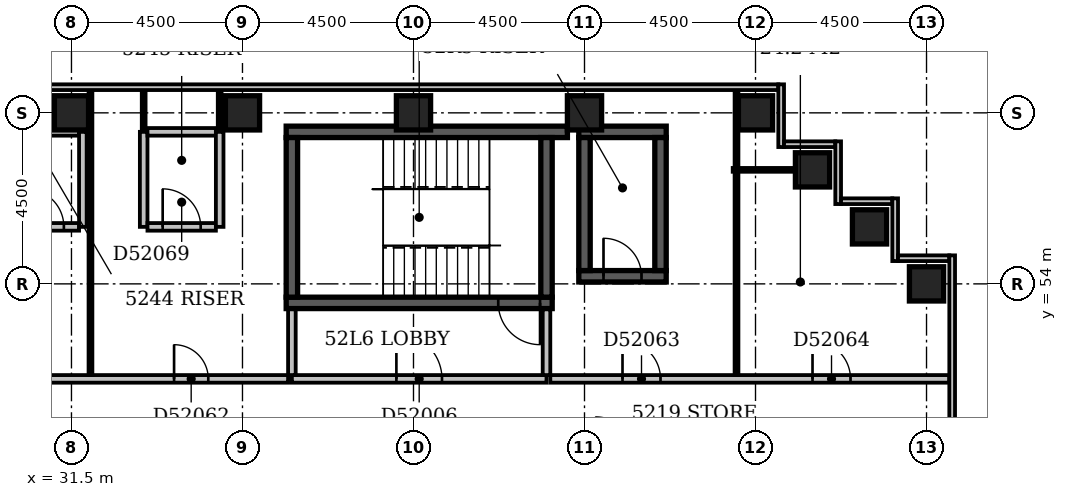
"""IFC4 building model, lengths in metres.
Left out: names, types, materials, properties, quantities, classifications, styles, units other than length and angle.
Written with IfcOpenShell. Run it as: python <this file> out.ifc"""

import sys

from ifc_helpers import new_model, si_unit, direction, frame, frame_2d, origin, origin_2d, place, context, subcontext, project, spatial, rectangle, extrude, element, fill, save


model = new_model("IFC4")
c1 = context("Model", 3, precision=1e-05, world=origin(), true_north=direction((0.0, 1.0)))
c2 = subcontext(c1, "Body", "Model", "MODEL_VIEW")
j1 = project(units=[si_unit("LENGTHUNIT", "METRE"), si_unit("PLANEANGLEUNIT", "RADIAN")], contexts=[c1])
p1 = place(None, origin())
s1 = spatial("IfcSite", under=j1, at=p1, CompositionType="ELEMENT")
p2 = place(p1, origin())
s2 = spatial("IfcBuilding", under=s1, at=p2, CompositionType="ELEMENT")
p3 = place(p2, frame((0.0, 0.0, 204.2)))
s3 = spatial("IfcBuildingStorey", under=s2, at=p3, CompositionType="ELEMENT", Elevation=204.2)
p4 = place(p3, frame((37.15, 53.5, -0.3), z_axis=(0.0, 0.0, 1.0), x_axis=(1.0, 0.0, 0.0)))
e1 = element("IfcWall", 1, at=p4, inside=s3, PredefinedType="SHEAR", context=c2, shape_type="SweptSolid", body=[
    extrude(rectangle(XDim=7.0, YDim=0.3, at=frame_2d((3.5, 0.0))), origin(), (0.0, 0.0, 1.0), 3.6),
])
p5 = place(p4, frame((5.58, 0.0, 0.3)))
e2 = element("IfcOpeningElement", 2, at=p5, cuts=e1, PredefinedType="OPENING", context=c2, shape_type="SweptSolid", body=[
    extrude(rectangle(XDim=1.1, YDim=2.1, at=frame_2d((0.55, 1.05))), frame((0.0, 0.162, 0.0), z_axis=(0.0, -1.0, 0.0), x_axis=(1.0, 0.0, 0.0)), (0.0, 0.0, 1.0), 0.324),
])
p6 = place(p3, frame((37.15, 58.0, -0.3), z_axis=(0.0, 0.0, 1.0), x_axis=(1.0, 0.0, 0.0)))
e3 = element("IfcWall", 3, at=p6, inside=s3, PredefinedType="SHEAR", context=c2, shape_type="SweptSolid", body=[
    extrude(rectangle(XDim=7.4, YDim=0.3, at=frame_2d((3.7, 0.0))), origin(), (0.0, 0.0, 1.0), 3.6),
])
for number, where, z_axis, x_axis in (
    (4, (37.3, 53.65, -0.3), (0.0, 0.0, 1.0), (0.0, 1.0, 0.0)),
    (5, (44.0, 53.65, -0.3), (0.0, 0.0, 1.0), (0.0, 1.0, 0.0)),
):
    element("IfcWall", number, at=place(p3, frame(where, z_axis=z_axis, x_axis=x_axis)), inside=s3, PredefinedType="SHEAR", context=c2, shape_type="SweptSolid", body=[
        extrude(rectangle(XDim=4.2, YDim=0.3, at=frame_2d((2.1, 0.0))), origin(), (0.0, 0.0, 1.0), 3.6),
    ])
p7 = place(p3, frame((44.85, 54.2, -0.3), z_axis=(0.0, 0.0, 1.0), x_axis=(1.0, 0.0, 0.0)))
e6 = element("IfcWall", 6, at=p7, inside=s3, PredefinedType="SHEAR", context=c2, shape_type="SweptSolid", body=[
    extrude(rectangle(XDim=2.3, YDim=0.3, at=frame_2d((1.15, 0.0))), origin(), (0.0, 0.0, 1.0), 3.6),
])
p8 = place(p7, frame((0.65, 0.0, 0.3)))
e7 = element("IfcOpeningElement", 7, at=p8, cuts=e6, PredefinedType="OPENING", context=c2, shape_type="SweptSolid", body=[
    extrude(rectangle(XDim=1.0, YDim=2.1, at=frame_2d((0.5, 1.05))), frame((0.0, 0.162, 0.0), z_axis=(0.0, -1.0, 0.0), x_axis=(1.0, 0.0, 0.0)), (0.0, 0.0, 1.0), 0.324),
])
p9 = place(p3, frame((44.85, 58.0, -0.3), z_axis=(0.0, 0.0, 1.0), x_axis=(1.0, 0.0, 0.0)))
e8 = element("IfcWall", 8, at=p9, inside=s3, PredefinedType="SHEAR", context=c2, shape_type="SweptSolid", body=[
    extrude(rectangle(XDim=2.3, YDim=0.3, at=frame_2d((1.15, 0.0))), origin(), (0.0, 0.0, 1.0), 3.6),
])
for number, where, z_axis, x_axis in (
    (9, (45.0, 54.35, -0.3), (0.0, 0.0, 1.0), (0.0, 1.0, 0.0)),
    (10, (47.0, 54.35, -0.3), (0.0, 0.0, 1.0), (0.0, 1.0, 0.0)),
):
    element("IfcWall", number, at=place(p3, frame(where, z_axis=z_axis, x_axis=x_axis)), inside=s3, PredefinedType="SHEAR", context=c2, shape_type="SweptSolid", body=[
        extrude(rectangle(XDim=3.5, YDim=0.3, at=frame_2d((1.75, 0.0))), origin(), (0.0, 0.0, 1.0), 3.6),
    ])
for number, where, z_axis, x_axis in (
    (11, (54.0, 54.0, -0.3), (0.0, 0.0, 1.0), (1.0, 0.0, 0.0)),
    (12, (52.5, 55.5, -0.3), (0.0, 0.0, 1.0), (1.0, 0.0, 0.0)),
    (13, (51.0, 57.0, -0.3), (0.0, 0.0, 1.0), (1.0, 0.0, 0.0)),
    (14, (31.5, 58.5, -0.3), (0.0, 0.0, 1.0), (1.0, 0.0, 0.0)),
    (15, (36.0, 58.5, -0.3), (0.0, 0.0, 1.0), (1.0, 0.0, 0.0)),
    (16, (40.5, 58.5, -0.3), (0.0, 0.0, 1.0), (1.0, 0.0, 0.0)),
    (17, (45.0, 58.5, -0.3), (0.0, 0.0, 1.0), (1.0, 0.0, 0.0)),
    (18, (49.5, 58.5, -0.3), (0.0, 0.0, 1.0), (1.0, 0.0, 0.0)),
):
    element("IfcColumn", number, at=place(p3, frame(where, z_axis=z_axis, x_axis=x_axis)), inside=s3, PredefinedType="COLUMN", context=c2, shape_type="SweptSolid", body=[
        extrude(rectangle(XDim=0.9, YDim=0.9, at=origin_2d()), origin(), (0.0, 0.0, 1.0), 3.6),
    ])
p10 = place(p3, frame((54.675, 39.9, 0.0), z_axis=(0.0, 0.0, 1.0), x_axis=(0.0, 1.0, 0.0)))
e19 = element("IfcWall", 19, at=p10, inside=s3, PredefinedType="STANDARD", context=c2, shape_type="SweptSolid", body=[
    extrude(rectangle(XDim=14.85, YDim=0.15, at=frame_2d((7.425, 0.0))), origin(), (0.0, 0.0, 1.0), 2.7),
])
p11 = place(p10, frame((6.15, 0.0, 0.6)))
e20 = element("IfcOpeningElement", 20, at=p11, cuts=e19, PredefinedType="OPENING", context=c2, shape_type="SweptSolid", body=[
    extrude(rectangle(XDim=2.4, YDim=1.8, at=frame_2d((1.2, 0.9))), frame((0.0, 0.087, 0.0), z_axis=(0.0, -1.0, 0.0), x_axis=(1.0, 0.0, 0.0)), (0.0, 0.0, 1.0), 0.174),
])
p12 = place(p3, frame((54.6, 54.675, 0.0), z_axis=(0.0, 0.0, 1.0), x_axis=(-1.0, 0.0, 0.0)))
e21 = element("IfcWall", 21, at=p12, inside=s3, PredefinedType="STANDARD", context=c2, shape_type="SweptSolid", body=[
    extrude(rectangle(XDim=1.35, YDim=0.15, at=frame_2d((0.675, 0.0))), origin(), (0.0, 0.0, 1.0), 2.7),
])
p13 = place(p3, frame((53.175, 54.6, 0.0), z_axis=(0.0, 0.0, 1.0), x_axis=(0.0, 1.0, 0.0)))
e22 = element("IfcWall", 22, at=p13, inside=s3, PredefinedType="STANDARD", context=c2, shape_type="SweptSolid", body=[
    extrude(rectangle(XDim=1.65, YDim=0.15, at=frame_2d((0.825, 0.0))), origin(), (0.0, 0.0, 1.0), 2.7),
])
p14 = place(p3, frame((53.1, 56.175, 0.0), z_axis=(0.0, 0.0, 1.0), x_axis=(-1.0, 0.0, 0.0)))
e23 = element("IfcWall", 23, at=p14, inside=s3, PredefinedType="STANDARD", context=c2, shape_type="SweptSolid", body=[
    extrude(rectangle(XDim=1.35, YDim=0.15, at=frame_2d((0.675, 0.0))), origin(), (0.0, 0.0, 1.0), 2.7),
])
p15 = place(p3, frame((51.675, 56.1, 0.0), z_axis=(0.0, 0.0, 1.0), x_axis=(0.0, 1.0, 0.0)))
e24 = element("IfcWall", 24, at=p15, inside=s3, PredefinedType="STANDARD", context=c2, shape_type="SweptSolid", body=[
    extrude(rectangle(XDim=1.65, YDim=0.15, at=frame_2d((0.825, 0.0))), origin(), (0.0, 0.0, 1.0), 2.7),
])
p16 = place(p3, frame((51.6, 57.675, 0.0), z_axis=(0.0, 0.0, 1.0), x_axis=(-1.0, 0.0, 0.0)))
e25 = element("IfcWall", 25, at=p16, inside=s3, PredefinedType="STANDARD", context=c2, shape_type="SweptSolid", body=[
    extrude(rectangle(XDim=1.35, YDim=0.15, at=frame_2d((0.675, 0.0))), origin(), (0.0, 0.0, 1.0), 2.7),
])
p17 = place(p3, frame((50.175, 57.6, 0.0), z_axis=(0.0, 0.0, 1.0), x_axis=(0.0, 1.0, 0.0)))
e26 = element("IfcWall", 26, at=p17, inside=s3, PredefinedType="STANDARD", context=c2, shape_type="SweptSolid", body=[
    extrude(rectangle(XDim=1.65, YDim=0.15, at=frame_2d((0.825, 0.0))), origin(), (0.0, 0.0, 1.0), 2.7),
])
p18 = place(p3, frame((50.1, 59.175, 0.0), z_axis=(0.0, 0.0, 1.0), x_axis=(-1.0, 0.0, 0.0)))
e27 = element("IfcWall", 27, at=p18, inside=s3, PredefinedType="STANDARD", context=c2, shape_type="SweptSolid", body=[
    extrude(rectangle(XDim=50.85, YDim=0.15, at=frame_2d((25.425, 0.0))), origin(), (0.0, 0.0, 1.0), 2.7),
])
p19 = place(p3, frame((37.3, 51.5, 0.0), z_axis=(0.0, 0.0, 1.0), x_axis=(1.0, 0.0, 0.0)))
e28 = element("IfcWall", 28, at=p19, inside=s3, PredefinedType="PARTITIONING", context=c2, shape_type="SweptSolid", body=[
    extrude(rectangle(XDim=6.7, YDim=0.2, at=frame_2d((3.35, 0.0))), origin(), (0.0, 0.0, 1.0), 3.3),
])
p20 = place(p19, frame((2.75, 0.0, 0.0)))
e29 = element("IfcOpeningElement", 29, at=p20, cuts=e28, PredefinedType="OPENING", context=c2, shape_type="SweptSolid", body=[
    extrude(rectangle(XDim=1.2, YDim=2.1, at=frame_2d((0.6, 1.05))), frame((0.0, 0.112, 0.0), z_axis=(0.0, -1.0, 0.0), x_axis=(1.0, 0.0, 0.0)), (0.0, 0.0, 1.0), 0.224),
])
for number, where, z_axis, x_axis in (
    (30, (44.0, 51.6, 0.0), (0.0, 0.0, 1.0), (0.0, 1.0, 0.0)),
    (31, (37.3, 51.6, 0.0), (0.0, 0.0, 1.0), (0.0, 1.0, 0.0)),
):
    element("IfcWall", number, at=place(p3, frame(where, z_axis=z_axis, x_axis=x_axis)), inside=s3, PredefinedType="PARTITIONING", context=c2, shape_type="SweptSolid", body=[
        extrude(rectangle(XDim=1.73, YDim=0.2, at=frame_2d((0.865, 0.0))), origin(), (0.0, 0.0, 1.0), 3.3),
    ])
p21 = place(p3, frame((27.9, 51.5, 0.0), z_axis=(0.0, 0.0, 1.0), x_axis=(1.0, 0.0, 0.0)))
e32 = element("IfcWall", 32, at=p21, inside=s3, PredefinedType="PARTITIONING", context=c2, shape_type="SweptSolid", body=[
    extrude(rectangle(XDim=9.3, YDim=0.2, at=frame_2d((4.65, 0.0))), origin(), (0.0, 0.0, 1.0), 3.3),
])
p22 = place(p21, frame((1.5, 0.0, 0.0)))
e33 = element("IfcOpeningElement", 33, at=p22, cuts=e32, PredefinedType="OPENING", context=c2, shape_type="SweptSolid", body=[
    extrude(rectangle(XDim=1.0, YDim=2.1, at=frame_2d((0.5, 1.05))), frame((0.0, 0.112, 0.0), z_axis=(0.0, -1.0, 0.0), x_axis=(1.0, 0.0, 0.0)), (0.0, 0.0, 1.0), 0.224),
])
p23 = place(p21, frame((6.3, 0.0, 0.0)))
e34 = element("IfcOpeningElement", 34, at=p23, cuts=e32, PredefinedType="OPENING", context=c2, shape_type="SweptSolid", body=[
    extrude(rectangle(XDim=0.9, YDim=2.1, at=frame_2d((0.45, 1.05))), frame((0.0, 0.112, 0.0), z_axis=(0.0, -1.0, 0.0), x_axis=(1.0, 0.0, 0.0)), (0.0, 0.0, 1.0), 0.224),
])
p24 = place(p3, frame((44.1, 51.5, 0.0), z_axis=(0.0, 0.0, 1.0), x_axis=(1.0, 0.0, 0.0)))
e35 = element("IfcWall", 35, at=p24, inside=s3, PredefinedType="PARTITIONING", context=c2, shape_type="SweptSolid", body=[
    extrude(rectangle(XDim=10.5, YDim=0.2, at=frame_2d((5.25, 0.0))), origin(), (0.0, 0.0, 1.0), 3.3),
])
p25 = place(p24, frame((1.9, 0.0, 0.0)))
e36 = element("IfcOpeningElement", 36, at=p25, cuts=e35, PredefinedType="OPENING", context=c2, shape_type="SweptSolid", body=[
    extrude(rectangle(XDim=1.0, YDim=2.1, at=frame_2d((0.5, 1.05))), frame((0.0, 0.112, 0.0), z_axis=(0.0, -1.0, 0.0), x_axis=(1.0, 0.0, 0.0)), (0.0, 0.0, 1.0), 0.224),
])
p26 = place(p24, frame((6.9, 0.0, 0.0)))
e37 = element("IfcOpeningElement", 37, at=p26, cuts=e35, PredefinedType="OPENING", context=c2, shape_type="SweptSolid", body=[
    extrude(rectangle(XDim=1.0, YDim=2.1, at=frame_2d((0.5, 1.05))), frame((0.0, 0.112, 0.0), z_axis=(0.0, -1.0, 0.0), x_axis=(1.0, 0.0, 0.0)), (0.0, 0.0, 1.0), 0.224),
])
for number, where, z_axis, x_axis in (
    (38, (32.0, 51.6, 0.0), (0.0, 0.0, 1.0), (0.0, 1.0, 0.0)),
    (39, (49.0, 51.6, 0.0), (0.0, 0.0, 1.0), (0.0, 1.0, 0.0)),
):
    element("IfcWall", number, at=place(p3, frame(where, z_axis=z_axis, x_axis=x_axis)), inside=s3, PredefinedType="PARTITIONING", context=c2, shape_type="SweptSolid", body=[
        extrude(rectangle(XDim=7.5, YDim=0.1, at=frame_2d((3.75, 0.0))), origin(), (0.0, 0.0, 1.0), 3.3),
    ])
p27 = place(p3, frame((29.9, 55.5, 0.0), z_axis=(0.0, 0.0, 1.0), x_axis=(1.0, 0.0, 0.0)))
e40 = element("IfcWall", 40, at=p27, inside=s3, PredefinedType="PARTITIONING", context=c2, shape_type="SweptSolid", body=[
    extrude(rectangle(XDim=1.8, YDim=0.2, at=frame_2d((0.9, 0.0))), origin(), (0.0, 0.0, 1.0), 3.3),
])
p28 = place(p27, frame((0.4, 0.0, 0.0)))
e41 = element("IfcOpeningElement", 41, at=p28, cuts=e40, PredefinedType="OPENING", context=c2, shape_type="SweptSolid", body=[
    extrude(rectangle(XDim=1.0, YDim=2.1, at=frame_2d((0.5, 1.05))), frame((0.0, 0.112, 0.0), z_axis=(0.0, -1.0, 0.0), x_axis=(1.0, 0.0, 0.0)), (0.0, 0.0, 1.0), 0.224),
])
for number, where, z_axis, x_axis in (
    (42, (31.8, 55.5, 0.0), (0.0, 0.0, 1.0), (0.0, 1.0, 0.0)),
    (43, (33.4, 55.5, 0.0), (0.0, 0.0, 1.0), (0.0, 1.0, 0.0)),
):
    element("IfcWall", number, at=place(p3, frame(where, z_axis=z_axis, x_axis=x_axis)), inside=s3, PredefinedType="PARTITIONING", context=c2, shape_type="SweptSolid", body=[
        extrude(rectangle(XDim=2.5, YDim=0.2, at=frame_2d((1.25, 0.0))), origin(), (0.0, 0.0, 1.0), 3.3),
    ])
p29 = place(p3, frame((33.5, 55.5, 0.0), z_axis=(0.0, 0.0, 1.0), x_axis=(1.0, 0.0, 0.0)))
e44 = element("IfcWall", 44, at=p29, inside=s3, PredefinedType="PARTITIONING", context=c2, shape_type="SweptSolid", body=[
    extrude(rectangle(XDim=1.8, YDim=0.2, at=frame_2d((0.9, 0.0))), origin(), (0.0, 0.0, 1.0), 3.3),
])
p30 = place(p29, frame((0.4, 0.0, 0.0)))
e45 = element("IfcOpeningElement", 45, at=p30, cuts=e44, PredefinedType="OPENING", context=c2, shape_type="SweptSolid", body=[
    extrude(rectangle(XDim=1.0, YDim=2.1, at=frame_2d((0.5, 1.05))), frame((0.0, 0.112, 0.0), z_axis=(0.0, -1.0, 0.0), x_axis=(1.0, 0.0, 0.0)), (0.0, 0.0, 1.0), 0.224),
])
p31 = place(p3, frame((35.4, 55.5, 0.0), z_axis=(0.0, 0.0, 1.0), x_axis=(0.0, 1.0, 0.0)))
e46 = element("IfcWall", 46, at=p31, inside=s3, PredefinedType="PARTITIONING", context=c2, shape_type="SweptSolid", body=[
    extrude(rectangle(XDim=2.5, YDim=0.2, at=frame_2d((1.25, 0.0))), origin(), (0.0, 0.0, 1.0), 2.4),
])
p32 = place(p3, frame((48.9, 57.0, 0.0), z_axis=(0.0, 0.0, 1.0), x_axis=(1.0, 0.0, 0.0)))
e47 = element("IfcWall", 47, at=p32, inside=s3, PredefinedType="PARTITIONING", context=c2, shape_type="SweptSolid", body=[
    extrude(rectangle(XDim=1.65, YDim=0.1, at=frame_2d((0.825, 0.0))), origin(), (0.0, 0.0, 1.0), 3.3),
])
p33 = place(p3, frame((29.9, 58.0, 0.0), z_axis=(0.0, 0.0, 1.0), x_axis=(1.0, 0.0, 0.0)))
e48 = element("IfcWall", 48, at=p33, inside=s3, PredefinedType="PARTITIONING", context=c2, shape_type="SweptSolid", body=[
    extrude(rectangle(XDim=1.8, YDim=0.2, at=frame_2d((0.9, 0.0))), origin(), (0.0, 0.0, 1.0), 3.3),
])
p34 = place(p3, frame((33.4, 58.0, 0.0), z_axis=(0.0, 0.0, 1.0), x_axis=(0.0, 1.0, 0.0)))
e49 = element("IfcWall", 49, at=p34, inside=s3, PredefinedType="PARTITIONING", context=c2, shape_type="SweptSolid", body=[
    extrude(rectangle(XDim=1.1, YDim=0.1, at=frame_2d((0.55, 0.0))), origin(), (0.0, 0.0, 1.0), 3.3),
])
p35 = place(p3, frame((33.5, 58.0, 0.0), z_axis=(0.0, 0.0, 1.0), x_axis=(1.0, 0.0, 0.0)))
e50 = element("IfcWall", 50, at=p35, inside=s3, PredefinedType="PARTITIONING", context=c2, shape_type="SweptSolid", body=[
    extrude(rectangle(XDim=1.8, YDim=0.2, at=frame_2d((0.9, 0.0))), origin(), (0.0, 0.0, 1.0), 3.3),
])
p36 = place(p3, frame((35.4, 58.0, 0.0), z_axis=(0.0, 0.0, 1.0), x_axis=(0.0, 1.0, 0.0)))
e51 = element("IfcWall", 51, at=p36, inside=s3, PredefinedType="PARTITIONING", context=c2, shape_type="SweptSolid", body=[
    extrude(rectangle(XDim=1.1, YDim=0.1, at=frame_2d((0.55, 0.0))), origin(), (0.0, 0.0, 1.0), 2.4),
])
p37 = place(p20, origin())
e52 = element("IfcDoor", 52, at=p37, inside=s3, OperationType="SINGLE_SWING_LEFT", PredefinedType="DOOR", context=c2, shape_type="SweptSolid", body=[
    extrude(rectangle(XDim=1.2, YDim=2.1, at=frame_2d((0.6, 1.05))), frame((0.0, 0.025, 0.0), z_axis=(0.0, -1.0, 0.0), x_axis=(1.0, 0.0, 0.0)), (0.0, 0.0, 1.0), 0.05),
])
fill(e29, e52)
p38 = place(p8, origin())
e53 = element("IfcDoor", 53, at=p38, inside=s3, OperationType="SINGLE_SWING_LEFT", PredefinedType="DOOR", context=c2, shape_type="SweptSolid", body=[
    extrude(rectangle(XDim=1.0, YDim=2.1, at=frame_2d((0.5, 1.05))), frame((0.0, 0.025, 0.0), z_axis=(0.0, -1.0, 0.0), x_axis=(1.0, 0.0, 0.0)), (0.0, 0.0, 1.0), 0.05),
])
fill(e7, e53)
p39 = place(p5, origin())
e54 = element("IfcDoor", 54, at=p39, inside=s3, OperationType="SINGLE_SWING_RIGHT", PredefinedType="DOOR", context=c2, shape_type="SweptSolid", body=[
    extrude(rectangle(XDim=1.1, YDim=2.1, at=frame_2d((0.55, 1.05))), frame((0.0, 0.025, 0.0), z_axis=(0.0, -1.0, 0.0), x_axis=(1.0, 0.0, 0.0)), (0.0, 0.0, 1.0), 0.05),
])
fill(e2, e54)
p40 = place(p23, origin())
e55 = element("IfcDoor", 55, at=p40, inside=s3, OperationType="SINGLE_SWING_LEFT", PredefinedType="DOOR", context=c2, shape_type="SweptSolid", body=[
    extrude(rectangle(XDim=0.9, YDim=2.1, at=frame_2d((0.45, 1.05))), frame((0.0, 0.025, 0.0), z_axis=(0.0, -1.0, 0.0), x_axis=(1.0, 0.0, 0.0)), (0.0, 0.0, 1.0), 0.05),
])
fill(e34, e55)
p41 = place(p25, origin())
e56 = element("IfcDoor", 56, at=p41, inside=s3, OperationType="SINGLE_SWING_LEFT", PredefinedType="DOOR", context=c2, shape_type="SweptSolid", body=[
    extrude(rectangle(XDim=1.0, YDim=2.1, at=frame_2d((0.5, 1.05))), frame((0.0, 0.025, 0.0), z_axis=(0.0, -1.0, 0.0), x_axis=(1.0, 0.0, 0.0)), (0.0, 0.0, 1.0), 0.05),
])
fill(e36, e56)
p42 = place(p26, origin())
e57 = element("IfcDoor", 57, at=p42, inside=s3, OperationType="SINGLE_SWING_LEFT", PredefinedType="DOOR", context=c2, shape_type="SweptSolid", body=[
    extrude(rectangle(XDim=1.0, YDim=2.1, at=frame_2d((0.5, 1.05))), frame((0.0, 0.025, 0.0), z_axis=(0.0, -1.0, 0.0), x_axis=(1.0, 0.0, 0.0)), (0.0, 0.0, 1.0), 0.05),
])
fill(e37, e57)
p43 = place(p28, origin())
e58 = element("IfcDoor", 58, at=p43, inside=s3, OperationType="SINGLE_SWING_LEFT", PredefinedType="DOOR", context=c2, shape_type="SweptSolid", body=[
    extrude(rectangle(XDim=1.0, YDim=2.1, at=frame_2d((0.5, 1.05))), frame((0.0, 0.025, 0.0), z_axis=(0.0, -1.0, 0.0), x_axis=(1.0, 0.0, 0.0)), (0.0, 0.0, 1.0), 0.05),
])
fill(e41, e58)
p44 = place(p30, origin())
e59 = element("IfcDoor", 59, at=p44, inside=s3, OperationType="SINGLE_SWING_LEFT", PredefinedType="DOOR", context=c2, shape_type="SweptSolid", body=[
    extrude(rectangle(XDim=1.0, YDim=2.1, at=frame_2d((0.5, 1.05))), frame((0.0, 0.025, 0.0), z_axis=(0.0, -1.0, 0.0), x_axis=(1.0, 0.0, 0.0)), (0.0, 0.0, 1.0), 0.05),
])
fill(e45, e59)
save(model, sys.argv[1])
